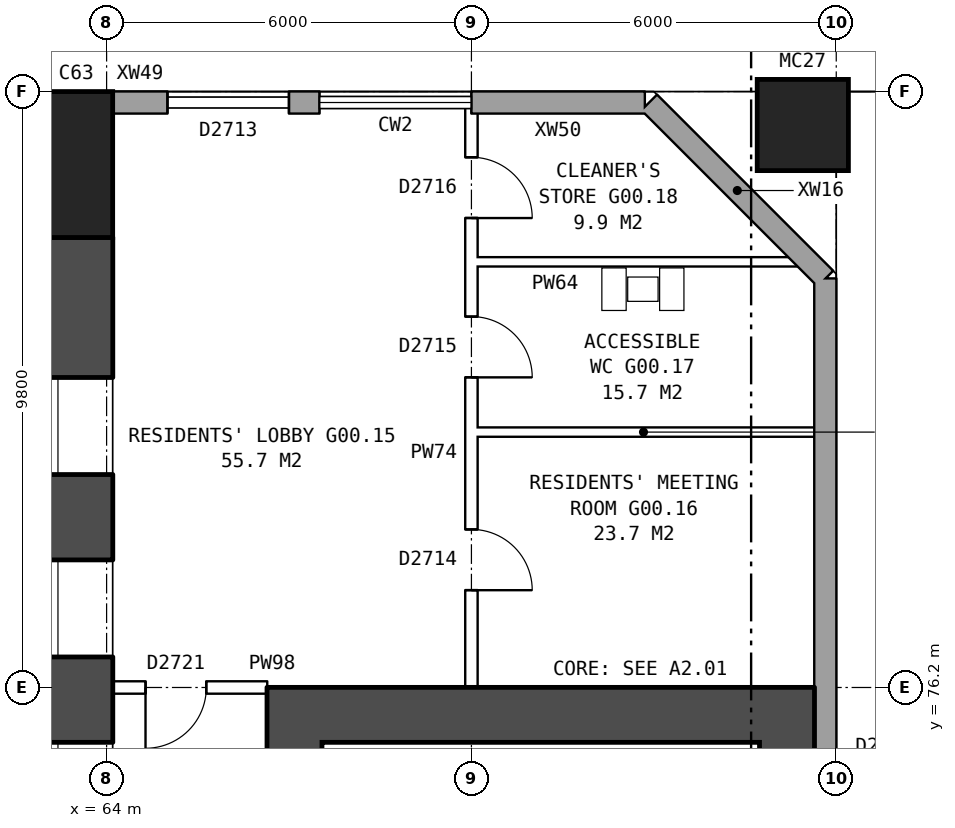
"""IFC4 building model, lengths in metres.
Left out: names, types, materials, properties, quantities, classifications, styles, units other than length and angle.
Written with IfcOpenShell. Run it as: python <this file> out.ifc"""

import sys

from ifc_helpers import new_model, si_unit, direction, frame, frame_2d, origin, origin_2d, place, context, subcontext, project, spatial, rectangle, hollow_rectangle, extrude, element, fill, save


model = new_model("IFC4")
c1 = context("Model", 3, precision=1e-05, world=origin(), true_north=direction((0.0, 1.0)))
c2 = subcontext(c1, "Body", "Model", "MODEL_VIEW")
j1 = project(units=[si_unit("LENGTHUNIT", "METRE"), si_unit("PLANEANGLEUNIT", "RADIAN")], contexts=[c1])
p1 = place(None, origin())
s1 = spatial("IfcSite", under=j1, at=p1, CompositionType="ELEMENT")
p2 = place(p1, origin())
s2 = spatial("IfcBuilding", under=s1, at=p2, CompositionType="ELEMENT")
p3 = place(p2, origin())
s3 = spatial("IfcBuildingStorey", under=s2, at=p3, CompositionType="ELEMENT", Elevation=0.0)
p4 = place(p3, frame((63.5, 84.8, -0.35), z_axis=(0.0, 0.0, 1.0), x_axis=(1.0, 0.0, 0.0)))
e1 = element("IfcColumn", 1, at=p4, inside=s3, PredefinedType="COLUMN", context=c2, shape_type="SweptSolid", body=[
    extrude(rectangle(XDim=1.2, YDim=2.4, at=origin_2d()), origin(), (0.0, 0.0, 1.0), 5.55),
])
p5 = place(p3, frame((63.5, 56.4, -0.35), z_axis=(0.0, 0.0, 1.0), x_axis=(0.0, 1.0, 0.0)))
e2 = element("IfcWall", 2, at=p5, inside=s3, PredefinedType="SHEAR", context=c2, shape_type="SweptSolid", body=[
    extrude(rectangle(XDim=27.2, YDim=1.2, at=frame_2d((13.6, 0.0))), origin(), (0.0, 0.0, 1.0), 5.55),
])
p6 = place(p5, frame((2.3, 0.0, 0.8)))
e3 = element("IfcOpeningElement", 3, at=p6, cuts=e2, PredefinedType="OPENING", context=c2, shape_type="SweptSolid", body=[
    extrude(rectangle(XDim=1.6, YDim=1.8, at=frame_2d((0.8, 0.9))), frame((0.0, 0.61, 0.0), z_axis=(0.0, -1.0, 0.0), x_axis=(1.0, 0.0, 0.0)), (0.0, 0.0, 1.0), 1.22),
])
p7 = place(p5, frame((5.3, 0.0, 0.8)))
e4 = element("IfcOpeningElement", 4, at=p7, cuts=e2, PredefinedType="OPENING", context=c2, shape_type="SweptSolid", body=[
    extrude(rectangle(XDim=1.6, YDim=1.8, at=frame_2d((0.8, 0.9))), frame((0.0, 0.61, 0.0), z_axis=(0.0, -1.0, 0.0), x_axis=(1.0, 0.0, 0.0)), (0.0, 0.0, 1.0), 1.22),
])
p8 = place(p5, frame((8.3, 0.0, 0.8)))
e5 = element("IfcOpeningElement", 5, at=p8, cuts=e2, PredefinedType="OPENING", context=c2, shape_type="SweptSolid", body=[
    extrude(rectangle(XDim=1.6, YDim=1.8, at=frame_2d((0.8, 0.9))), frame((0.0, 0.61, 0.0), z_axis=(0.0, -1.0, 0.0), x_axis=(1.0, 0.0, 0.0)), (0.0, 0.0, 1.0), 1.22),
])
p9 = place(p5, frame((11.3, 0.0, 0.8)))
e6 = element("IfcOpeningElement", 6, at=p9, cuts=e2, PredefinedType="OPENING", context=c2, shape_type="SweptSolid", body=[
    extrude(rectangle(XDim=1.6, YDim=1.8, at=frame_2d((0.8, 0.9))), frame((0.0, 0.61, 0.0), z_axis=(0.0, -1.0, 0.0), x_axis=(1.0, 0.0, 0.0)), (0.0, 0.0, 1.0), 1.22),
])
p10 = place(p5, frame((14.3, 0.0, 0.8)))
e7 = element("IfcOpeningElement", 7, at=p10, cuts=e2, PredefinedType="OPENING", context=c2, shape_type="SweptSolid", body=[
    extrude(rectangle(XDim=1.6, YDim=1.8, at=frame_2d((0.8, 0.9))), frame((0.0, 0.61, 0.0), z_axis=(0.0, -1.0, 0.0), x_axis=(1.0, 0.0, 0.0)), (0.0, 0.0, 1.0), 1.22),
])
p11 = place(p5, frame((17.3, 0.0, 0.8)))
e8 = element("IfcOpeningElement", 8, at=p11, cuts=e2, PredefinedType="OPENING", context=c2, shape_type="SweptSolid", body=[
    extrude(rectangle(XDim=1.6, YDim=1.8, at=frame_2d((0.8, 0.9))), frame((0.0, 0.61, 0.0), z_axis=(0.0, -1.0, 0.0), x_axis=(1.0, 0.0, 0.0)), (0.0, 0.0, 1.0), 1.22),
])
p12 = place(p5, frame((20.3, 0.0, 0.8)))
e9 = element("IfcOpeningElement", 9, at=p12, cuts=e2, PredefinedType="OPENING", context=c2, shape_type="SweptSolid", body=[
    extrude(rectangle(XDim=1.6, YDim=1.8, at=frame_2d((0.8, 0.9))), frame((0.0, 0.61, 0.0), z_axis=(0.0, -1.0, 0.0), x_axis=(1.0, 0.0, 0.0)), (0.0, 0.0, 1.0), 1.22),
])
p13 = place(p5, frame((23.3, 0.0, 0.8)))
e10 = element("IfcOpeningElement", 10, at=p13, cuts=e2, PredefinedType="OPENING", context=c2, shape_type="SweptSolid", body=[
    extrude(rectangle(XDim=1.6, YDim=1.8, at=frame_2d((0.8, 0.9))), frame((0.0, 0.61, 0.0), z_axis=(0.0, -1.0, 0.0), x_axis=(1.0, 0.0, 0.0)), (0.0, 0.0, 1.0), 1.22),
])
p14 = place(p3, frame((75.45, 85.45, -0.35), z_axis=(0.0, 0.0, 1.0), x_axis=(1.0, 0.0, 0.0)))
e11 = element("IfcColumn", 11, at=p14, inside=s3, PredefinedType="COLUMN", context=c2, shape_type="SweptSolid", body=[
    extrude(hollow_rectangle(XDim=1.5, YDim=1.5, WallThickness=0.08, at=origin_2d()), origin(), (0.0, 0.0, 1.0), 5.85),
])
p15 = place(p3, frame((75.82, 57.075, 0.0), z_axis=(0.0, 0.0, 1.0), x_axis=(0.0, 1.0, 0.0)))
e12 = element("IfcWall", 12, at=p15, inside=s3, PredefinedType="STANDARD", context=c2, shape_type="SweptSolid", body=[
    extrude(rectangle(XDim=25.851, YDim=0.36, at=frame_2d((12.925, 0.0))), origin(), (0.0, 0.0, 1.0), 5.2),
])
p16 = place(p15, frame((4.625, 0.0, 0.8)))
e13 = element("IfcOpeningElement", 13, at=p16, cuts=e12, PredefinedType="OPENING", context=c2, shape_type="SweptSolid", body=[
    extrude(rectangle(XDim=1.6, YDim=1.8, at=frame_2d((0.8, 0.9))), frame((0.0, 0.19, 0.0), z_axis=(0.0, -1.0, 0.0), x_axis=(1.0, 0.0, 0.0)), (0.0, 0.0, 1.0), 0.38),
])
p17 = place(p15, frame((16.625, 0.0, 0.0)))
e14 = element("IfcOpeningElement", 14, at=p17, cuts=e12, PredefinedType="OPENING", context=c2, shape_type="SweptSolid", body=[
    extrude(rectangle(XDim=1.1, YDim=2.1, at=frame_2d((0.55, 1.05))), frame((0.0, 0.19, 0.0), z_axis=(0.0, -1.0, 0.0), x_axis=(1.0, 0.0, 0.0)), (0.0, 0.0, 1.0), 0.38),
])
p18 = place(p3, frame((75.82, 82.925, 0.0), z_axis=(0.0, 0.0, 1.0), x_axis=(-0.707106781187, 0.707106781187, 0.0)))
e15 = element("IfcWall", 15, at=p18, inside=s3, PredefinedType="STANDARD", context=c2, shape_type="SweptSolid", body=[
    extrude(rectangle(XDim=4.094, YDim=0.36, at=frame_2d((2.047, 0.0))), origin(), (0.0, 0.0, 1.0), 5.2),
])
p19 = place(p3, frame((72.85, 85.82, 0.0), z_axis=(0.0, 0.0, 1.0), x_axis=(-1.0, 0.0, 0.0)))
e16 = element("IfcWall", 16, at=p19, inside=s3, PredefinedType="STANDARD", context=c2, shape_type="SweptSolid", body=[
    extrude(rectangle(XDim=2.85, YDim=0.36, at=frame_2d((1.425, 0.0))), origin(), (0.0, 0.0, 1.0), 5.2),
])
p20 = place(p3, frame((67.5, 85.82, 0.0), z_axis=(0.0, 0.0, 1.0), x_axis=(-1.0, 0.0, 0.0)))
e17 = element("IfcWall", 17, at=p20, inside=s3, PredefinedType="STANDARD", context=c2, shape_type="SweptSolid", body=[
    extrude(rectangle(XDim=3.4, YDim=0.36, at=frame_2d((1.7, 0.0))), origin(), (0.0, 0.0, 1.0), 5.2),
])
p21 = place(p20, frame((0.5, 0.0, 0.0)))
e18 = element("IfcOpeningElement", 18, at=p21, cuts=e17, PredefinedType="OPENING", context=c2, shape_type="SweptSolid", body=[
    extrude(rectangle(XDim=2.0, YDim=2.4, at=frame_2d((1.0, 1.2))), frame((0.0, 0.19, 0.0), z_axis=(0.0, -1.0, 0.0), x_axis=(1.0, 0.0, 0.0)), (0.0, 0.0, 1.0), 0.38),
])
p22 = place(p3, frame((67.09, 64.7, 0.0), z_axis=(0.0, 0.0, 1.0), x_axis=(0.0, 1.0, 0.0)))
e19 = element("IfcWall", 19, at=p22, inside=s3, PredefinedType="SHEAR", context=c2, shape_type="SweptSolid", body=[
    extrude(rectangle(XDim=10.6, YDim=0.9, at=frame_2d((5.3, 0.0))), origin(), (0.0, 0.0, 1.0), 5.2),
])
p23 = place(p22, frame((0.425, 0.0, 0.0)))
e20 = element("IfcOpeningElement", 20, at=p23, cuts=e19, PredefinedType="OPENING", context=c2, shape_type="SweptSolid", body=[
    extrude(rectangle(XDim=1.1, YDim=2.1, at=frame_2d((0.55, 1.05))), frame((0.0, 0.46, 0.0), z_axis=(0.0, -1.0, 0.0), x_axis=(1.0, 0.0, 0.0)), (0.0, 0.0, 1.0), 0.92),
])
p24 = place(p22, frame((2.7, 0.0, 0.0)))
e21 = element("IfcOpeningElement", 21, at=p24, cuts=e19, PredefinedType="OPENING", context=c2, shape_type="SweptSolid", body=[
    extrude(rectangle(XDim=1.1, YDim=2.1, at=frame_2d((0.55, 1.05))), frame((0.0, 0.46, 0.0), z_axis=(0.0, -1.0, 0.0), x_axis=(1.0, 0.0, 0.0)), (0.0, 0.0, 1.0), 0.92),
])
p25 = place(p22, frame((4.9, 0.0, 0.0)))
e22 = element("IfcOpeningElement", 22, at=p25, cuts=e19, PredefinedType="OPENING", context=c2, shape_type="SweptSolid", body=[
    extrude(rectangle(XDim=1.1, YDim=2.1, at=frame_2d((0.55, 1.05))), frame((0.0, 0.46, 0.0), z_axis=(0.0, -1.0, 0.0), x_axis=(1.0, 0.0, 0.0)), (0.0, 0.0, 1.0), 0.92),
])
p26 = place(p22, frame((7.1, 0.0, 0.0)))
e23 = element("IfcOpeningElement", 23, at=p26, cuts=e19, PredefinedType="OPENING", context=c2, shape_type="SweptSolid", body=[
    extrude(rectangle(XDim=1.1, YDim=2.1, at=frame_2d((0.55, 1.05))), frame((0.0, 0.46, 0.0), z_axis=(0.0, -1.0, 0.0), x_axis=(1.0, 0.0, 0.0)), (0.0, 0.0, 1.0), 0.92),
])
p27 = place(p22, frame((9.0, 0.0, 0.0)))
e24 = element("IfcOpeningElement", 24, at=p27, cuts=e19, PredefinedType="OPENING", context=c2, shape_type="SweptSolid", body=[
    extrude(rectangle(XDim=1.1, YDim=2.1, at=frame_2d((0.55, 1.05))), frame((0.0, 0.46, 0.0), z_axis=(0.0, -1.0, 0.0), x_axis=(1.0, 0.0, 0.0)), (0.0, 0.0, 1.0), 0.92),
])
p28 = place(p3, frame((75.19, 64.7, 0.0), z_axis=(0.0, 0.0, 1.0), x_axis=(0.0, 1.0, 0.0)))
e25 = element("IfcWall", 25, at=p28, inside=s3, PredefinedType="SHEAR", context=c2, shape_type="SweptSolid", body=[
    extrude(rectangle(XDim=10.6, YDim=0.9, at=frame_2d((5.3, 0.0))), origin(), (0.0, 0.0, 1.0), 5.2),
])
p29 = place(p28, frame((9.0, 0.0, 0.0)))
e26 = element("IfcOpeningElement", 26, at=p29, cuts=e25, PredefinedType="OPENING", context=c2, shape_type="SweptSolid", body=[
    extrude(rectangle(XDim=1.1, YDim=2.1, at=frame_2d((0.55, 1.05))), frame((0.0, 0.46, 0.0), z_axis=(0.0, -1.0, 0.0), x_axis=(1.0, 0.0, 0.0)), (0.0, 0.0, 1.0), 0.92),
])
p30 = place(p3, frame((66.64, 75.75, 0.0), z_axis=(0.0, 0.0, 1.0), x_axis=(1.0, 0.0, 0.0)))
e27 = element("IfcWall", 27, at=p30, inside=s3, PredefinedType="SHEAR", context=c2, shape_type="SweptSolid", body=[
    extrude(rectangle(XDim=9.0, YDim=0.9, at=frame_2d((4.5, 0.0))), origin(), (0.0, 0.0, 1.0), 5.2),
])
p31 = place(p3, frame((64.1, 76.2, 0.0), z_axis=(0.0, 0.0, 1.0), x_axis=(1.0, 0.0, 0.0)))
e28 = element("IfcWall", 28, at=p31, inside=s3, PredefinedType="PARTITIONING", context=c2, shape_type="SweptSolid", body=[
    extrude(rectangle(XDim=2.54, YDim=0.2, at=frame_2d((1.27, 0.0))), origin(), (0.0, 0.0, 1.0), 5.2),
])
p32 = place(p31, frame((0.54, 0.0, 0.0)))
e29 = element("IfcOpeningElement", 29, at=p32, cuts=e28, PredefinedType="OPENING", context=c2, shape_type="SweptSolid", body=[
    extrude(rectangle(XDim=1.0, YDim=2.1, at=frame_2d((0.5, 1.05))), frame((0.0, 0.11, 0.0), z_axis=(0.0, -1.0, 0.0), x_axis=(1.0, 0.0, 0.0)), (0.0, 0.0, 1.0), 0.22),
])
p33 = place(p3, frame((69.9, 80.4, 0.0), z_axis=(0.0, 0.0, 1.0), x_axis=(1.0, 0.0, 0.0)))
e30 = element("IfcWall", 30, at=p33, inside=s3, PredefinedType="PLUMBINGWALL", context=c2, shape_type="SweptSolid", body=[
    extrude(rectangle(XDim=5.86, YDim=0.15, at=frame_2d((2.93, 0.0))), origin(), (0.0, 0.0, 1.0), 5.2),
])
p34 = place(p3, frame((69.9, 83.2, 0.0), z_axis=(0.0, 0.0, 1.0), x_axis=(1.0, 0.0, 0.0)))
e31 = element("IfcWall", 31, at=p34, inside=s3, PredefinedType="PLUMBINGWALL", context=c2, shape_type="SweptSolid", body=[
    extrude(rectangle(XDim=5.511, YDim=0.15, at=frame_2d((2.755, 0.0))), origin(), (0.0, 0.0, 1.0), 5.2),
])
p35 = place(p3, frame((70.0, 76.2, 0.0), z_axis=(0.0, 0.0, 1.0), x_axis=(0.0, 1.0, 0.0)))
e32 = element("IfcWall", 32, at=p35, inside=s3, PredefinedType="PARTITIONING", context=c2, shape_type="SweptSolid", body=[
    extrude(rectangle(XDim=9.56, YDim=0.2, at=frame_2d((4.78, 0.0))), origin(), (0.0, 0.0, 1.0), 5.2),
])
p36 = place(p35, frame((1.6, 0.0, 0.0)))
e33 = element("IfcOpeningElement", 33, at=p36, cuts=e32, PredefinedType="OPENING", context=c2, shape_type="SweptSolid", body=[
    extrude(rectangle(XDim=1.0, YDim=2.1, at=frame_2d((0.5, 1.05))), frame((0.0, 0.11, 0.0), z_axis=(0.0, -1.0, 0.0), x_axis=(1.0, 0.0, 0.0)), (0.0, 0.0, 1.0), 0.22),
])
p37 = place(p35, frame((5.1, 0.0, 0.0)))
e34 = element("IfcOpeningElement", 34, at=p37, cuts=e32, PredefinedType="OPENING", context=c2, shape_type="SweptSolid", body=[
    extrude(rectangle(XDim=1.0, YDim=2.1, at=frame_2d((0.5, 1.05))), frame((0.0, 0.11, 0.0), z_axis=(0.0, -1.0, 0.0), x_axis=(1.0, 0.0, 0.0)), (0.0, 0.0, 1.0), 0.22),
])
p38 = place(p35, frame((7.72, 0.0, 0.0)))
e35 = element("IfcOpeningElement", 35, at=p38, cuts=e32, PredefinedType="OPENING", context=c2, shape_type="SweptSolid", body=[
    extrude(rectangle(XDim=1.0, YDim=2.1, at=frame_2d((0.5, 1.05))), frame((0.0, 0.11, 0.0), z_axis=(0.0, -1.0, 0.0), x_axis=(1.0, 0.0, 0.0)), (0.0, 0.0, 1.0), 0.22),
])
p39 = place(p21, frame((2.0, 0.0, 0.0), z_axis=(0.0, 0.0, 1.0), x_axis=(-1.0, 0.0, 0.0)))
e36 = element("IfcDoor", 36, at=p39, inside=s3, OperationType="DOUBLE_DOOR_SLIDING", PredefinedType="DOOR", context=c2, shape_type="SweptSolid", body=[
    extrude(rectangle(XDim=2.0, YDim=2.4, at=frame_2d((1.0, 1.2))), frame((0.0, 0.025, 0.0), z_axis=(0.0, -1.0, 0.0), x_axis=(1.0, 0.0, 0.0)), (0.0, 0.0, 1.0), 0.05),
])
fill(e18, e36)
p40 = place(p11, origin())
e37 = element("IfcWindow", 37, at=p40, inside=s3, PartitioningType="SINGLE_PANEL", PredefinedType="WINDOW", context=c2, shape_type="SweptSolid", body=[
    extrude(rectangle(XDim=1.6, YDim=1.8, at=frame_2d((0.8, 0.9))), frame((0.0, 0.33, 0.0), z_axis=(0.0, -1.0, 0.0), x_axis=(1.0, 0.0, 0.0)), (0.0, 0.0, 1.0), 0.06),
])
fill(e8, e37)
p41 = place(p12, origin())
e38 = element("IfcWindow", 38, at=p41, inside=s3, PartitioningType="SINGLE_PANEL", PredefinedType="WINDOW", context=c2, shape_type="SweptSolid", body=[
    extrude(rectangle(XDim=1.6, YDim=1.8, at=frame_2d((0.8, 0.9))), frame((0.0, 0.33, 0.0), z_axis=(0.0, -1.0, 0.0), x_axis=(1.0, 0.0, 0.0)), (0.0, 0.0, 1.0), 0.06),
])
fill(e9, e38)
p42 = place(p13, origin())
e39 = element("IfcWindow", 39, at=p42, inside=s3, PartitioningType="SINGLE_PANEL", PredefinedType="WINDOW", context=c2, shape_type="SweptSolid", body=[
    extrude(rectangle(XDim=1.6, YDim=1.8, at=frame_2d((0.8, 0.9))), frame((0.0, 0.33, 0.0), z_axis=(0.0, -1.0, 0.0), x_axis=(1.0, 0.0, 0.0)), (0.0, 0.0, 1.0), 0.06),
])
fill(e10, e39)
p43 = place(p32, frame((1.0, 0.0, 0.0), z_axis=(0.0, 0.0, 1.0), x_axis=(-1.0, 0.0, 0.0)))
e40 = element("IfcDoor", 40, at=p43, inside=s3, OperationType="SINGLE_SWING_RIGHT", PredefinedType="DOOR", context=c2, shape_type="SweptSolid", body=[
    extrude(rectangle(XDim=1.0, YDim=2.1, at=frame_2d((0.5, 1.05))), frame((0.0, 0.025, 0.0), z_axis=(0.0, -1.0, 0.0), x_axis=(1.0, 0.0, 0.0)), (0.0, 0.0, 1.0), 0.05),
])
fill(e29, e40)
p44 = place(p36, frame((1.0, 0.0, 0.0), z_axis=(0.0, 0.0, 1.0), x_axis=(-1.0, 0.0, 0.0)))
e41 = element("IfcDoor", 41, at=p44, inside=s3, OperationType="SINGLE_SWING_RIGHT", PredefinedType="DOOR", context=c2, shape_type="SweptSolid", body=[
    extrude(rectangle(XDim=1.0, YDim=2.1, at=frame_2d((0.5, 1.05))), frame((0.0, 0.025, 0.0), z_axis=(0.0, -1.0, 0.0), x_axis=(1.0, 0.0, 0.0)), (0.0, 0.0, 1.0), 0.05),
])
fill(e33, e41)
p45 = place(p37, frame((1.0, 0.0, 0.0), z_axis=(0.0, 0.0, 1.0), x_axis=(-1.0, 0.0, 0.0)))
e42 = element("IfcDoor", 42, at=p45, inside=s3, OperationType="SINGLE_SWING_RIGHT", PredefinedType="DOOR", context=c2, shape_type="SweptSolid", body=[
    extrude(rectangle(XDim=1.0, YDim=2.1, at=frame_2d((0.5, 1.05))), frame((0.0, 0.025, 0.0), z_axis=(0.0, -1.0, 0.0), x_axis=(1.0, 0.0, 0.0)), (0.0, 0.0, 1.0), 0.05),
])
fill(e34, e42)
p46 = place(p38, frame((1.0, 0.0, 0.0), z_axis=(0.0, 0.0, 1.0), x_axis=(-1.0, 0.0, 0.0)))
e43 = element("IfcDoor", 43, at=p46, inside=s3, OperationType="SINGLE_SWING_RIGHT", PredefinedType="DOOR", context=c2, shape_type="SweptSolid", body=[
    extrude(rectangle(XDim=1.0, YDim=2.1, at=frame_2d((0.5, 1.05))), frame((0.0, 0.025, 0.0), z_axis=(0.0, -1.0, 0.0), x_axis=(1.0, 0.0, 0.0)), (0.0, 0.0, 1.0), 0.05),
])
fill(e35, e43)
save(model, sys.argv[1])
